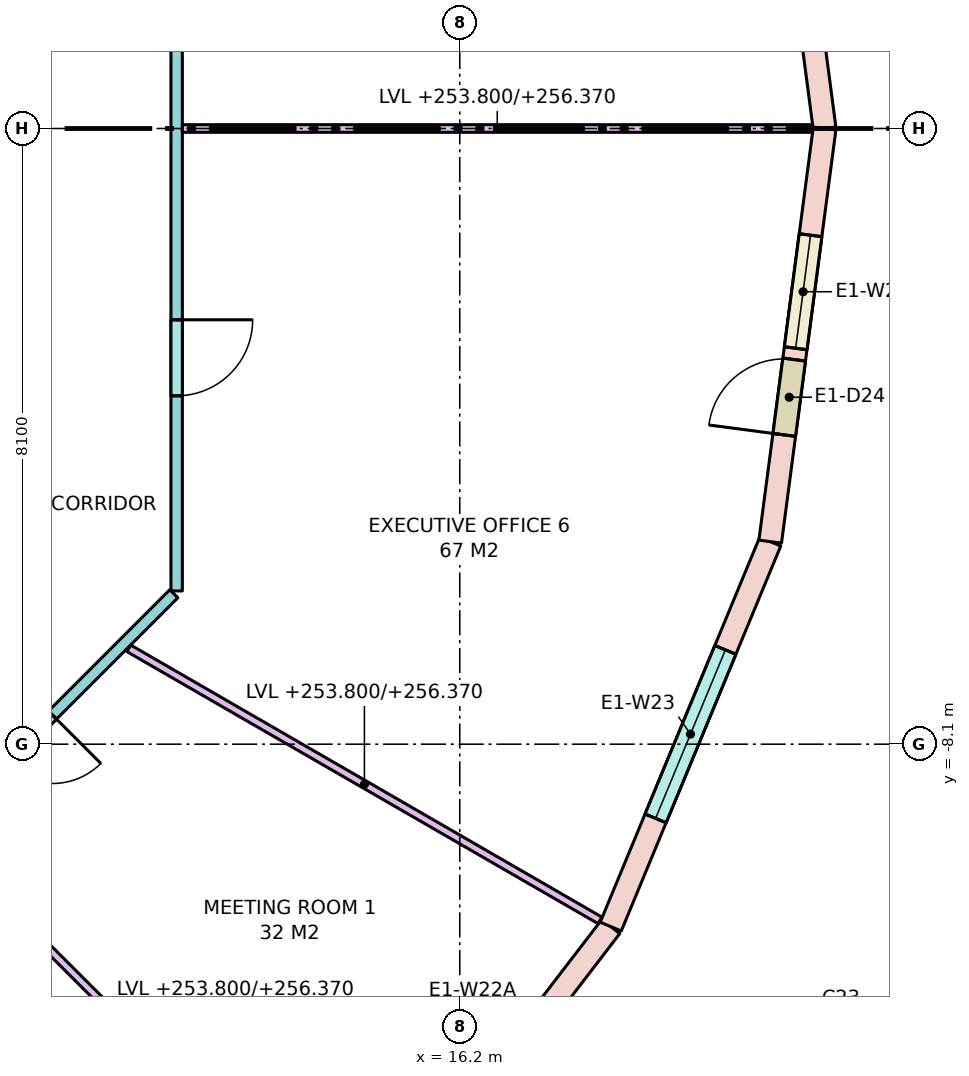
"""IFC4 building model, lengths in metres.
Left out: names, types, materials, properties, quantities, classifications, styles, units other than length and angle.
Written with IfcOpenShell. Run it as: python <this file> out.ifc"""

import sys

from ifc_helpers import new_model, si_unit, direction, frame, frame_2d, origin, place, context, subcontext, project, spatial, rectangle, extrude, element, fill, save


model = new_model("IFC4")
c1 = context("Model", 3, precision=1e-05, world=origin(), true_north=direction((0.0, 1.0)))
c2 = subcontext(c1, "Body", "Model", "MODEL_VIEW")
j1 = project(units=[si_unit("LENGTHUNIT", "METRE"), si_unit("PLANEANGLEUNIT", "RADIAN")], contexts=[c1])
p1 = place(None, origin())
s1 = spatial("IfcSite", under=j1, at=p1, CompositionType="ELEMENT")
p2 = place(p1, origin())
s2 = spatial("IfcBuilding", under=s1, at=p2, CompositionType="ELEMENT")
p3 = place(p2, frame((0.0, 0.0, 253.8)))
s3 = spatial("IfcBuildingStorey", under=s2, at=p3, CompositionType="ELEMENT", Elevation=253.8)
p4 = place(p3, frame((21.0, 0.0, 0.0), z_axis=(0.0, 0.0, 1.0), x_axis=(-0.130527087244, 0.991444743541, 0.0)))
e1 = element("IfcWall", 1, at=p4, inside=s3, PredefinedType="STANDARD", context=c2, shape_type="SweptSolid", body=[
    extrude(rectangle(XDim=5.482, YDim=0.3, at=frame_2d((2.741, 0.0))), origin(), (0.0, 0.0, 1.0), 3.42),
])
p5 = place(p4, frame((1.541, 0.0, 0.8)))
e2 = element("IfcOpeningElement", 2, at=p5, cuts=e1, PredefinedType="OPENING", context=c2, shape_type="SweptSolid", body=[
    extrude(rectangle(XDim=2.4, YDim=2.4, at=frame_2d((1.2, 1.2))), frame((0.0, 0.16, 0.0), z_axis=(0.0, -1.0, 0.0), x_axis=(1.0, 0.0, 0.0)), (0.0, 0.0, 1.0), 0.32),
])
p6 = place(p3, frame((14.849, -14.849, 0.0), z_axis=(0.0, 0.0, 1.0), x_axis=(0.608784891166, 0.793335336593, 0.0)))
e3 = element("IfcWall", 3, at=p6, inside=s3, PredefinedType="STANDARD", context=c2, shape_type="SweptSolid", body=[
    extrude(rectangle(XDim=5.482, YDim=0.3, at=frame_2d((2.741, 0.0))), origin(), (0.0, 0.0, 1.0), 3.42),
])
p7 = place(p6, frame((1.416, 0.0, 0.0)))
e4 = element("IfcOpeningElement", 4, at=p7, cuts=e3, PredefinedType="OPENING", context=c2, shape_type="SweptSolid", body=[
    extrude(rectangle(XDim=1.0, YDim=2.4, at=frame_2d((0.5, 1.2))), frame((0.0, 0.16, 0.0), z_axis=(0.0, -1.0, 0.0), x_axis=(1.0, 0.0, 0.0)), (0.0, 0.0, 1.0), 0.32),
])
p8 = place(p6, frame((2.566, 0.0, 0.8)))
e5 = element("IfcOpeningElement", 5, at=p8, cuts=e3, PredefinedType="OPENING", context=c2, shape_type="SweptSolid", body=[
    extrude(rectangle(XDim=1.5, YDim=2.4, at=frame_2d((0.75, 1.2))), frame((0.0, 0.16, 0.0), z_axis=(0.0, -1.0, 0.0), x_axis=(1.0, 0.0, 0.0)), (0.0, 0.0, 1.0), 0.32),
])
p9 = place(p3, frame((18.187, -10.5, 0.0), z_axis=(0.0, 0.0, 1.0), x_axis=(0.382688740813, 0.923877333662, 0.0)))
e6 = element("IfcWall", 6, at=p9, inside=s3, PredefinedType="STANDARD", context=c2, shape_type="SweptSolid", body=[
    extrude(rectangle(XDim=5.482, YDim=0.3, at=frame_2d((2.741, 0.0))), origin(), (0.0, 0.0, 1.0), 3.42),
])
p10 = place(p9, frame((1.541, 0.0, 0.8)))
e7 = element("IfcOpeningElement", 7, at=p10, cuts=e6, PredefinedType="OPENING", context=c2, shape_type="SweptSolid", body=[
    extrude(rectangle(XDim=2.4, YDim=2.4, at=frame_2d((1.2, 1.2))), frame((0.0, 0.16, 0.0), z_axis=(0.0, -1.0, 0.0), x_axis=(1.0, 0.0, 0.0)), (0.0, 0.0, 1.0), 0.32),
])
p11 = place(p3, frame((20.284, -5.435, 0.0), z_axis=(0.0, 0.0, 1.0), x_axis=(0.130527087244, 0.991444743541, 0.0)))
e8 = element("IfcWall", 8, at=p11, inside=s3, PredefinedType="STANDARD", context=c2, shape_type="SweptSolid", body=[
    extrude(rectangle(XDim=5.482, YDim=0.3, at=frame_2d((2.741, 0.0))), origin(), (0.0, 0.0, 1.0), 3.42),
])
p12 = place(p11, frame((1.416, 0.0, 0.0)))
e9 = element("IfcOpeningElement", 9, at=p12, cuts=e8, PredefinedType="OPENING", context=c2, shape_type="SweptSolid", body=[
    extrude(rectangle(XDim=1.0, YDim=2.4, at=frame_2d((0.5, 1.2))), frame((0.0, 0.16, 0.0), z_axis=(0.0, -1.0, 0.0), x_axis=(1.0, 0.0, 0.0)), (0.0, 0.0, 1.0), 0.32),
])
p13 = place(p11, frame((2.566, 0.0, 0.8)))
e10 = element("IfcOpeningElement", 10, at=p13, cuts=e8, PredefinedType="OPENING", context=c2, shape_type="SweptSolid", body=[
    extrude(rectangle(XDim=1.5, YDim=2.4, at=frame_2d((0.75, 1.2))), frame((0.0, 0.16, 0.0), z_axis=(0.0, -1.0, 0.0), x_axis=(1.0, 0.0, 0.0)), (0.0, 0.0, 1.0), 0.32),
])
p14 = place(p3, frame((12.438, -6.121, 0.0), z_axis=(0.0, 0.0, 1.0), x_axis=(-0.707106781187, -0.707106781187, 0.0)))
e11 = element("IfcWall", 11, at=p14, inside=s3, PredefinedType="PARTITIONING", context=c2, shape_type="SweptSolid", body=[
    extrude(rectangle(XDim=6.105, YDim=0.15, at=frame_2d((3.053, 0.0))), origin(), (0.0, 0.0, 1.0), 2.57),
])
p15 = place(p14, frame((4.811, 0.0, 0.0)))
e12 = element("IfcOpeningElement", 12, at=p15, cuts=e11, PredefinedType="OPENING", context=c2, shape_type="SweptSolid", body=[
    extrude(rectangle(XDim=0.9, YDim=2.1, at=frame_2d((0.45, 1.05))), frame((0.0, 0.085, 0.0), z_axis=(0.0, -1.0, 0.0), x_axis=(1.0, 0.0, 0.0)), (0.0, 0.0, 1.0), 0.17),
])
p16 = place(p14, frame((2.258, 0.0, 0.0)))
e13 = element("IfcOpeningElement", 13, at=p16, cuts=e11, PredefinedType="OPENING", context=c2, shape_type="SweptSolid", body=[
    extrude(rectangle(XDim=0.9, YDim=2.1, at=frame_2d((0.45, 1.05))), frame((0.0, 0.085, 0.0), z_axis=(0.0, -1.0, 0.0), x_axis=(1.0, 0.0, 0.0)), (0.0, 0.0, 1.0), 0.17),
])
p17 = place(p3, frame((12.475, 6.084, 0.0), z_axis=(0.0, 0.0, 1.0), x_axis=(0.0, -1.0, 0.0)))
e14 = element("IfcWall", 14, at=p17, inside=s3, PredefinedType="PARTITIONING", context=c2, shape_type="SweptSolid", body=[
    extrude(rectangle(XDim=12.167, YDim=0.15, at=frame_2d((6.084, 0.0))), origin(), (0.0, 0.0, 1.0), 2.57),
])
p18 = place(p17, frame((8.601, 0.0, 0.0)))
e15 = element("IfcOpeningElement", 15, at=p18, cuts=e14, PredefinedType="OPENING", context=c2, shape_type="SweptSolid", body=[
    extrude(rectangle(XDim=1.0, YDim=2.1, at=frame_2d((0.5, 1.05))), frame((0.0, 0.085, 0.0), z_axis=(0.0, -1.0, 0.0), x_axis=(1.0, 0.0, 0.0)), (0.0, 0.0, 1.0), 0.17),
])
p19 = place(p17, frame((2.567, 0.0, 0.0)))
e16 = element("IfcOpeningElement", 16, at=p19, cuts=e14, PredefinedType="OPENING", context=c2, shape_type="SweptSolid", body=[
    extrude(rectangle(XDim=1.0, YDim=2.1, at=frame_2d((0.5, 1.05))), frame((0.0, 0.085, 0.0), z_axis=(0.0, -1.0, 0.0), x_axis=(1.0, 0.0, 0.0)), (0.0, 0.0, 1.0), 0.17),
])
p20 = place(p3, frame((12.55, 0.0, 0.0), z_axis=(0.0, 0.0, 1.0), x_axis=(1.0, 0.0, 0.0)))
e17 = element("IfcWall", 17, at=p20, inside=s3, PredefinedType="PARTITIONING", context=c2, shape_type="SweptSolid", body=[
    extrude(rectangle(XDim=8.287, YDim=0.1, at=frame_2d((4.143, 0.0))), origin(), (0.0, 0.0, 1.0), 2.57),
])
p21 = place(p3, frame((9.333, -9.333, 0.0), z_axis=(0.0, 0.0, 1.0), x_axis=(0.707106781187, -0.707106781187, 0.0)))
e18 = element("IfcWall", 18, at=p21, inside=s3, PredefinedType="PARTITIONING", context=c2, shape_type="SweptSolid", body=[
    extrude(rectangle(XDim=7.639, YDim=0.1, at=frame_2d((3.819, 0.0))), origin(), (0.0, 0.0, 1.0), 2.57),
])
p22 = place(p3, frame((11.846, -6.839, 0.0), z_axis=(0.0, 0.0, 1.0), x_axis=(0.866011787705, -0.500023583, 0.0)))
e19 = element("IfcWall", 19, at=p22, inside=s3, PredefinedType="PARTITIONING", context=c2, shape_type="SweptSolid", body=[
    extrude(rectangle(XDim=7.158, YDim=0.1, at=frame_2d((3.579, 0.0))), origin(), (0.0, 0.0, 1.0), 2.57),
])
p23 = place(p10, origin())
e20 = element("IfcWindow", 20, at=p23, inside=s3, PartitioningType="SINGLE_PANEL", PredefinedType="WINDOW", context=c2, shape_type="SweptSolid", body=[
    extrude(rectangle(XDim=2.4, YDim=2.4, at=frame_2d((1.2, 1.2))), frame((0.0, 0.03, 0.0), z_axis=(0.0, -1.0, 0.0), x_axis=(1.0, 0.0, 0.0)), (0.0, 0.0, 1.0), 0.06),
])
fill(e7, e20)
p24 = place(p12, origin())
e21 = element("IfcDoor", 21, at=p24, inside=s3, OperationType="SINGLE_SWING_LEFT", PredefinedType="DOOR", context=c2, shape_type="SweptSolid", body=[
    extrude(rectangle(XDim=1.0, YDim=2.4, at=frame_2d((0.5, 1.2))), frame((0.0, 0.025, 0.0), z_axis=(0.0, -1.0, 0.0), x_axis=(1.0, 0.0, 0.0)), (0.0, 0.0, 1.0), 0.05),
])
fill(e9, e21)
p25 = place(p13, origin())
e22 = element("IfcWindow", 22, at=p25, inside=s3, PartitioningType="SINGLE_PANEL", PredefinedType="WINDOW", context=c2, shape_type="SweptSolid", body=[
    extrude(rectangle(XDim=1.5, YDim=2.4, at=frame_2d((0.75, 1.2))), frame((0.0, 0.03, 0.0), z_axis=(0.0, -1.0, 0.0), x_axis=(1.0, 0.0, 0.0)), (0.0, 0.0, 1.0), 0.06),
])
fill(e10, e22)
p26 = place(p16, origin())
e23 = element("IfcDoor", 23, at=p26, inside=s3, OperationType="SINGLE_SWING_LEFT", PredefinedType="DOOR", context=c2, shape_type="SweptSolid", body=[
    extrude(rectangle(XDim=0.9, YDim=2.1, at=frame_2d((0.45, 1.05))), frame((0.0, 0.025, 0.0), z_axis=(0.0, -1.0, 0.0), x_axis=(1.0, 0.0, 0.0)), (0.0, 0.0, 1.0), 0.05),
])
fill(e13, e23)
p27 = place(p18, origin())
e24 = element("IfcDoor", 24, at=p27, inside=s3, OperationType="SINGLE_SWING_LEFT", PredefinedType="DOOR", context=c2, shape_type="SweptSolid", body=[
    extrude(rectangle(XDim=1.0, YDim=2.1, at=frame_2d((0.5, 1.05))), frame((0.0, 0.025, 0.0), z_axis=(0.0, -1.0, 0.0), x_axis=(1.0, 0.0, 0.0)), (0.0, 0.0, 1.0), 0.05),
])
fill(e15, e24)
save(model, sys.argv[1])
